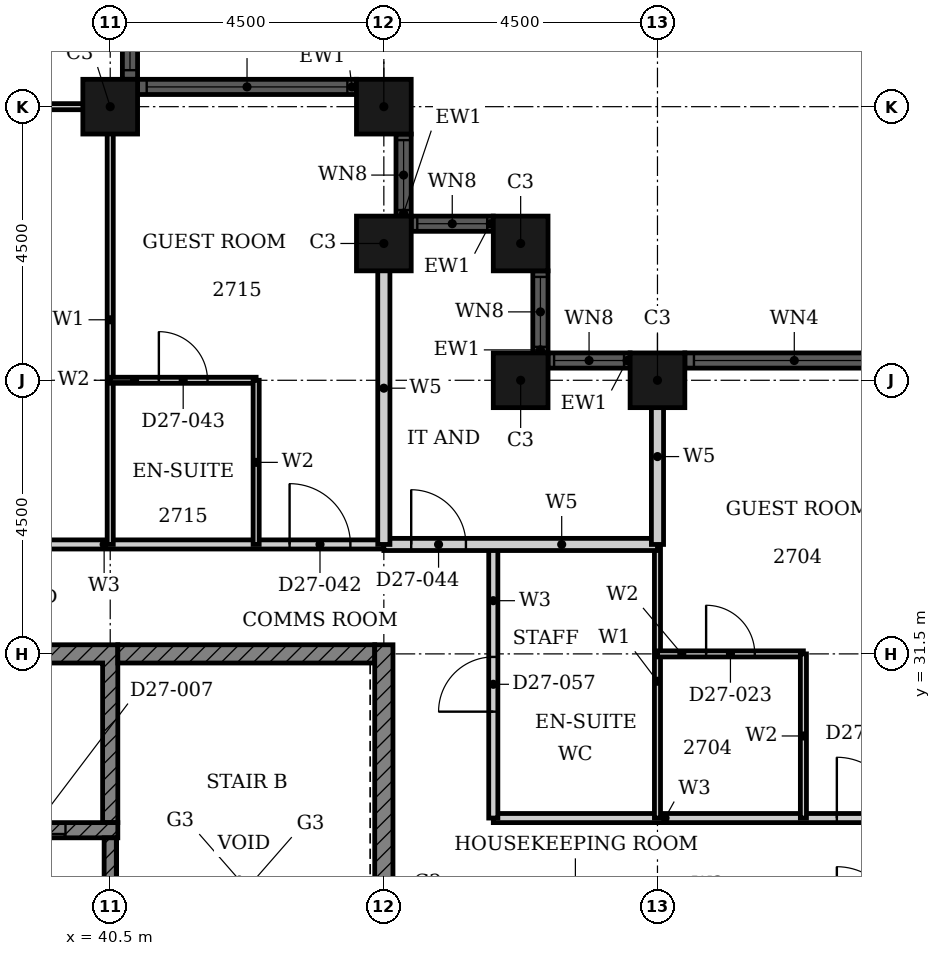
"""IFC4 building model, lengths in metres.
Left out: names, types, materials, properties, quantities, classifications, styles, units other than length and angle.
Written with IfcOpenShell. Run it as: python <this file> out.ifc"""

import sys

from ifc_helpers import new_model, si_unit, direction, frame, frame_2d, origin, origin_2d, place, context, subcontext, project, spatial, polyline, rectangle, hollow_rectangle, outline, extrude, element, fill, save


model = new_model("IFC4")
c1 = context("Model", 3, precision=1e-05, world=origin(), true_north=direction((0.0, 1.0)))
c2 = subcontext(c1, "Body", "Model", "MODEL_VIEW")
j1 = project(units=[si_unit("LENGTHUNIT", "METRE"), si_unit("PLANEANGLEUNIT", "RADIAN")], contexts=[c1])
p1 = place(None, origin())
s1 = spatial("IfcSite", under=j1, at=p1, CompositionType="ELEMENT")
p2 = place(p1, origin())
s2 = spatial("IfcBuilding", under=s1, at=p2, CompositionType="ELEMENT")
p3 = place(p2, frame((0.0, 0.0, 111.6)))
s3 = spatial("IfcBuildingStorey", under=s2, at=p3, CompositionType="ELEMENT", Elevation=111.6)
for number, where, z_axis, x_axis in (
    (1, (49.5, 36.0, 0.0), (0.0, 0.0, 1.0), (1.0, 0.0, 0.0)),
    (2, (47.25, 36.0, 0.0), (0.0, 0.0, 1.0), (1.0, 0.0, 0.0)),
    (3, (47.25, 38.25, 0.0), (0.0, 0.0, 1.0), (1.0, 0.0, 0.0)),
    (4, (45.0, 38.25, 0.0), (0.0, 0.0, 1.0), (1.0, 0.0, 0.0)),
    (5, (45.0, 40.5, 0.0), (0.0, 0.0, 1.0), (1.0, 0.0, 0.0)),
    (6, (40.5, 40.5, 0.0), (0.0, 0.0, 1.0), (1.0, 0.0, 0.0)),
):
    element("IfcColumn", number, at=place(p3, frame(where, z_axis=z_axis, x_axis=x_axis)), inside=s3, PredefinedType="COLUMN", context=c2, shape_type="SweptSolid", body=[
        extrude(hollow_rectangle(XDim=0.9, YDim=0.9, WallThickness=0.028, at=origin_2d()), origin(), (0.0, 0.0, 1.0), 3.6),
    ])
p4 = place(p3, frame((58.05, 36.325, 0.0), z_axis=(0.0, 0.0, 1.0), x_axis=(-1.0, 0.0, 0.0)))
e7 = element("IfcWall", 7, at=p4, inside=s3, PredefinedType="SOLIDWALL", context=c2, shape_type="SweptSolid", body=[
    extrude(rectangle(XDim=8.1, YDim=0.25, at=frame_2d((4.05, 0.0))), origin(), (0.0, 0.0, 1.0), 3.6),
])
p5 = place(p4, frame((0.15, 0.0, 0.9)))
e8 = element("IfcOpeningElement", 8, at=p5, cuts=e7, PredefinedType="OPENING", context=c2, shape_type="SweptSolid", body=[
    extrude(rectangle(XDim=3.3, YDim=2.08, at=frame_2d((1.65, 1.04))), frame((0.0, 0.135, 0.0), z_axis=(0.0, -1.0, 0.0), x_axis=(1.0, 0.0, 0.0)), (0.0, 0.0, 1.0), 0.27),
])
p6 = place(p4, frame((4.65, 0.0, 0.9)))
e9 = element("IfcOpeningElement", 9, at=p6, cuts=e7, PredefinedType="OPENING", context=c2, shape_type="SweptSolid", body=[
    extrude(rectangle(XDim=3.3, YDim=2.08, at=frame_2d((1.65, 1.04))), frame((0.0, 0.135, 0.0), z_axis=(0.0, -1.0, 0.0), x_axis=(1.0, 0.0, 0.0)), (0.0, 0.0, 1.0), 0.27),
])
p7 = place(p3, frame((49.05, 36.325, 0.0), z_axis=(0.0, 0.0, 1.0), x_axis=(-1.0, 0.0, 0.0)))
e10 = element("IfcWall", 10, at=p7, inside=s3, PredefinedType="SOLIDWALL", context=c2, shape_type="SweptSolid", body=[
    extrude(rectangle(XDim=1.35, YDim=0.25, at=frame_2d((0.675, 0.0))), origin(), (0.0, 0.0, 1.0), 3.6),
])
p8 = place(p7, frame((0.1, 0.0, 0.9)))
e11 = element("IfcOpeningElement", 11, at=p8, cuts=e10, PredefinedType="OPENING", context=c2, shape_type="SweptSolid", body=[
    extrude(rectangle(XDim=1.15, YDim=2.08, at=frame_2d((0.575, 1.04))), frame((0.0, 0.135, 0.0), z_axis=(0.0, -1.0, 0.0), x_axis=(1.0, 0.0, 0.0)), (0.0, 0.0, 1.0), 0.27),
])
p9 = place(p3, frame((47.575, 36.45, 0.0), z_axis=(0.0, 0.0, 1.0), x_axis=(0.0, 1.0, 0.0)))
e12 = element("IfcWall", 12, at=p9, inside=s3, PredefinedType="SOLIDWALL", context=c2, shape_type="SweptSolid", body=[
    extrude(rectangle(XDim=1.35, YDim=0.25, at=frame_2d((0.675, 0.0))), origin(), (0.0, 0.0, 1.0), 3.6),
])
p10 = place(p9, frame((0.1, 0.0, 0.9)))
e13 = element("IfcOpeningElement", 13, at=p10, cuts=e12, PredefinedType="OPENING", context=c2, shape_type="SweptSolid", body=[
    extrude(rectangle(XDim=1.15, YDim=2.08, at=frame_2d((0.575, 1.04))), frame((0.0, 0.135, 0.0), z_axis=(0.0, -1.0, 0.0), x_axis=(1.0, 0.0, 0.0)), (0.0, 0.0, 1.0), 0.27),
])
p11 = place(p3, frame((46.8, 38.575, 0.0), z_axis=(0.0, 0.0, 1.0), x_axis=(-1.0, 0.0, 0.0)))
e14 = element("IfcWall", 14, at=p11, inside=s3, PredefinedType="SOLIDWALL", context=c2, shape_type="SweptSolid", body=[
    extrude(rectangle(XDim=1.35, YDim=0.25, at=frame_2d((0.675, 0.0))), origin(), (0.0, 0.0, 1.0), 3.6),
])
p12 = place(p11, frame((0.1, 0.0, 0.9)))
e15 = element("IfcOpeningElement", 15, at=p12, cuts=e14, PredefinedType="OPENING", context=c2, shape_type="SweptSolid", body=[
    extrude(rectangle(XDim=1.15, YDim=2.08, at=frame_2d((0.575, 1.04))), frame((0.0, 0.135, 0.0), z_axis=(0.0, -1.0, 0.0), x_axis=(1.0, 0.0, 0.0)), (0.0, 0.0, 1.0), 0.27),
])
p13 = place(p3, frame((45.325, 38.7, 0.0), z_axis=(0.0, 0.0, 1.0), x_axis=(0.0, 1.0, 0.0)))
e16 = element("IfcWall", 16, at=p13, inside=s3, PredefinedType="SOLIDWALL", context=c2, shape_type="SweptSolid", body=[
    extrude(rectangle(XDim=1.35, YDim=0.25, at=frame_2d((0.675, 0.0))), origin(), (0.0, 0.0, 1.0), 3.6),
])
p14 = place(p13, frame((0.1, 0.0, 0.9)))
e17 = element("IfcOpeningElement", 17, at=p14, cuts=e16, PredefinedType="OPENING", context=c2, shape_type="SweptSolid", body=[
    extrude(rectangle(XDim=1.15, YDim=2.08, at=frame_2d((0.575, 1.04))), frame((0.0, 0.135, 0.0), z_axis=(0.0, -1.0, 0.0), x_axis=(1.0, 0.0, 0.0)), (0.0, 0.0, 1.0), 0.27),
])
p15 = place(p3, frame((44.55, 40.825, 0.0), z_axis=(0.0, 0.0, 1.0), x_axis=(-1.0, 0.0, 0.0)))
e18 = element("IfcWall", 18, at=p15, inside=s3, PredefinedType="SOLIDWALL", context=c2, shape_type="SweptSolid", body=[
    extrude(rectangle(XDim=3.6, YDim=0.25, at=frame_2d((1.8, 0.0))), origin(), (0.0, 0.0, 1.0), 3.6),
])
p16 = place(p15, frame((0.15, 0.0, 0.9)))
e19 = element("IfcOpeningElement", 19, at=p16, cuts=e18, PredefinedType="OPENING", context=c2, shape_type="SweptSolid", body=[
    extrude(rectangle(XDim=3.3, YDim=2.08, at=frame_2d((1.65, 1.04))), frame((0.0, 0.135, 0.0), z_axis=(0.0, -1.0, 0.0), x_axis=(1.0, 0.0, 0.0)), (0.0, 0.0, 1.0), 0.27),
])
p17 = place(p3, frame((40.825, 40.95, 0.0), z_axis=(0.0, 0.0, 1.0), x_axis=(0.0, 1.0, 0.0)))
e20 = element("IfcWall", 20, at=p17, inside=s3, PredefinedType="SOLIDWALL", context=c2, shape_type="SweptSolid", body=[
    extrude(rectangle(XDim=8.1, YDim=0.25, at=frame_2d((4.05, 0.0))), origin(), (0.0, 0.0, 1.0), 3.6),
])
p18 = place(p17, frame((0.15, 0.0, 0.9)))
e21 = element("IfcOpeningElement", 21, at=p18, cuts=e20, PredefinedType="OPENING", context=c2, shape_type="SweptSolid", body=[
    extrude(rectangle(XDim=3.3, YDim=2.08, at=frame_2d((1.65, 1.04))), frame((0.0, 0.135, 0.0), z_axis=(0.0, -1.0, 0.0), x_axis=(1.0, 0.0, 0.0)), (0.0, 0.0, 1.0), 0.27),
])
p19 = place(p17, frame((4.65, 0.0, 0.9)))
e22 = element("IfcOpeningElement", 22, at=p19, cuts=e20, PredefinedType="OPENING", context=c2, shape_type="SweptSolid", body=[
    extrude(rectangle(XDim=3.3, YDim=2.08, at=frame_2d((1.65, 1.04))), frame((0.0, 0.135, 0.0), z_axis=(0.0, -1.0, 0.0), x_axis=(1.0, 0.0, 0.0)), (0.0, 0.0, 1.0), 0.27),
])
p20 = place(p3, origin())
e23 = element("IfcWall", 23, at=p20, inside=s3, PredefinedType="SHEAR", context=c2, shape_type="SweptSolid", body=[
    extrude(outline(polyline([(24.947, 28.725), (25.197, 28.725), (25.197, 31.35), (27.518, 31.35), (27.518, 28.725), (27.768, 28.725), (27.768, 31.35), (30.089, 31.35), (30.089, 28.725), (30.339, 28.725), (30.339, 31.35), (32.661, 31.35), (32.661, 28.725), (32.911, 28.725), (32.911, 31.35), (35.232, 31.35), (35.232, 28.725), (35.482, 28.725), (35.482, 31.35), (37.803, 31.35), (37.803, 28.725), (38.053, 28.725), (38.053, 31.35), (40.375, 31.35), (40.375, 28.725), (40.625, 28.725), (40.625, 31.65), (24.947, 31.65), (24.947, 28.725)])), origin(), (0.0, 0.0, 1.0), 3.3),
])
p21 = place(p3, frame((40.625, 31.5, 0.0), z_axis=(0.0, 0.0, 1.0), x_axis=(1.0, 0.0, 0.0)))
e24 = element("IfcWall", 24, at=p21, inside=s3, PredefinedType="SHEAR", context=c2, shape_type="SweptSolid", body=[
    extrude(rectangle(XDim=4.225, YDim=0.3, at=frame_2d((2.113, 0.0))), origin(), (0.0, 0.0, 1.0), 3.3),
])
p22 = place(p3, frame((45.0, 22.35, 0.0), z_axis=(0.0, 0.0, 1.0), x_axis=(0.0, 1.0, 0.0)))
e25 = element("IfcWall", 25, at=p22, inside=s3, PredefinedType="SHEAR", context=c2, shape_type="SweptSolid", body=[
    extrude(rectangle(XDim=9.3, YDim=0.3, at=frame_2d((4.65, 0.0))), origin(), (0.0, 0.0, 1.0), 3.3),
])
p23 = place(p3, frame((24.947, 28.6, 0.0), z_axis=(0.0, 0.0, 1.0), x_axis=(1.0, 0.0, 0.0)))
e26 = element("IfcWall", 26, at=p23, inside=s3, PredefinedType="SHEAR", context=c2, shape_type="SweptSolid", body=[
    extrude(rectangle(XDim=15.678, YDim=0.25, at=frame_2d((7.839, 0.0))), origin(), (0.0, 0.0, 1.0), 3.3),
])
p24 = place(p23, frame((0.861, 0.0, 0.0)))
e27 = element("IfcOpeningElement", 27, at=p24, cuts=e26, PredefinedType="OPENING", context=c2, shape_type="SweptSolid", body=[
    extrude(rectangle(XDim=1.1, YDim=2.1, at=frame_2d((0.55, 1.05))), frame((0.0, 0.135, 0.0), z_axis=(0.0, -1.0, 0.0), x_axis=(1.0, 0.0, 0.0)), (0.0, 0.0, 1.0), 0.27),
])
p25 = place(p23, frame((8.575, 0.0, 0.0)))
e28 = element("IfcOpeningElement", 28, at=p25, cuts=e26, PredefinedType="OPENING", context=c2, shape_type="SweptSolid", body=[
    extrude(rectangle(XDim=1.1, YDim=2.1, at=frame_2d((0.55, 1.05))), frame((0.0, 0.135, 0.0), z_axis=(0.0, -1.0, 0.0), x_axis=(1.0, 0.0, 0.0)), (0.0, 0.0, 1.0), 0.27),
])
p26 = place(p23, frame((13.718, 0.0, 0.0)))
e29 = element("IfcOpeningElement", 29, at=p26, cuts=e26, PredefinedType="OPENING", context=c2, shape_type="SweptSolid", body=[
    extrude(rectangle(XDim=1.1, YDim=2.1, at=frame_2d((0.55, 1.05))), frame((0.0, 0.135, 0.0), z_axis=(0.0, -1.0, 0.0), x_axis=(1.0, 0.0, 0.0)), (0.0, 0.0, 1.0), 0.27),
])
p27 = place(p3, frame((40.5, 22.65, 0.0), z_axis=(0.0, 0.0, 1.0), x_axis=(0.0, 1.0, 0.0)))
e30 = element("IfcWall", 30, at=p27, inside=s3, PredefinedType="SHEAR", context=c2, shape_type="SweptSolid", body=[
    extrude(rectangle(XDim=5.825, YDim=0.2, at=frame_2d((2.913, 0.0))), origin(), (0.0, 0.0, 1.0), 3.3),
])
p28 = place(p27, frame((0.25, 0.0, 0.0)))
e31 = element("IfcOpeningElement", 31, at=p28, cuts=e30, PredefinedType="OPENING", context=c2, shape_type="SweptSolid", body=[
    extrude(rectangle(XDim=1.8, YDim=2.1, at=frame_2d((0.9, 1.05))), frame((0.0, 0.11, 0.0), z_axis=(0.0, -1.0, 0.0), x_axis=(1.0, 0.0, 0.0)), (0.0, 0.0, 1.0), 0.22),
])
p29 = place(p3, frame((46.8, 28.8, 0.0), z_axis=(0.0, 0.0, 1.0), x_axis=(1.0, 0.0, 0.0)))
e32 = element("IfcWall", 32, at=p29, inside=s3, PredefinedType="PARTITIONING", context=c2, shape_type="SweptSolid", body=[
    extrude(rectangle(XDim=7.2, YDim=0.15, at=frame_2d((3.6, 0.0))), origin(), (0.0, 0.0, 1.0), 3.3),
])
p30 = place(p29, frame((5.65, 0.0, 0.0)))
e33 = element("IfcOpeningElement", 33, at=p30, cuts=e32, PredefinedType="OPENING", context=c2, shape_type="SweptSolid", body=[
    extrude(rectangle(XDim=1.0, YDim=2.1, at=frame_2d((0.5, 1.05))), frame((0.0, 0.085, 0.0), z_axis=(0.0, -1.0, 0.0), x_axis=(1.0, 0.0, 0.0)), (0.0, 0.0, 1.0), 0.17),
])
p31 = place(p3, frame((33.3, 33.3, 0.0), z_axis=(0.0, 0.0, 1.0), x_axis=(1.0, 0.0, 0.0)))
e34 = element("IfcWall", 34, at=p31, inside=s3, PredefinedType="PARTITIONING", context=c2, shape_type="SweptSolid", body=[
    extrude(rectangle(XDim=11.7, YDim=0.15, at=frame_2d((5.85, 0.0))), origin(), (0.0, 0.0, 1.0), 3.3),
])
p32 = place(p31, frame((10.15, 0.0, 0.0)))
e35 = element("IfcOpeningElement", 35, at=p32, cuts=e34, PredefinedType="OPENING", context=c2, shape_type="SweptSolid", body=[
    extrude(rectangle(XDim=1.0, YDim=2.1, at=frame_2d((0.5, 1.05))), frame((0.0, 0.085, 0.0), z_axis=(0.0, -1.0, 0.0), x_axis=(1.0, 0.0, 0.0)), (0.0, 0.0, 1.0), 0.17),
])
p33 = place(p31, frame((3.15, 0.0, 0.0)))
e36 = element("IfcOpeningElement", 36, at=p33, cuts=e34, PredefinedType="OPENING", context=c2, shape_type="SweptSolid", body=[
    extrude(rectangle(XDim=0.9, YDim=2.1, at=frame_2d((0.45, 1.05))), frame((0.0, 0.085, 0.0), z_axis=(0.0, -1.0, 0.0), x_axis=(1.0, 0.0, 0.0)), (0.0, 0.0, 1.0), 0.17),
])
p34 = place(p3, frame((46.8, 28.8, 0.0), z_axis=(0.0, 0.0, 1.0), x_axis=(0.0, 1.0, 0.0)))
e37 = element("IfcWall", 37, at=p34, inside=s3, PredefinedType="PARTITIONING", context=c2, shape_type="SweptSolid", body=[
    extrude(rectangle(XDim=4.5, YDim=0.15, at=frame_2d((2.25, 0.0))), origin(), (0.0, 0.0, 1.0), 3.3),
])
p35 = place(p34, frame((1.75, 0.0, 0.0)))
e38 = element("IfcOpeningElement", 38, at=p35, cuts=e37, PredefinedType="OPENING", context=c2, shape_type="SweptSolid", body=[
    extrude(rectangle(XDim=0.9, YDim=2.1, at=frame_2d((0.45, 1.05))), frame((0.0, 0.085, 0.0), z_axis=(0.0, -1.0, 0.0), x_axis=(1.0, 0.0, 0.0)), (0.0, 0.0, 1.0), 0.17),
])
p36 = place(p3, frame((33.3, 40.5, 0.0), z_axis=(0.0, 0.0, 1.0), x_axis=(1.0, 0.0, 0.0)))
e39 = element("IfcWall", 39, at=p36, inside=s3, PredefinedType="PARTITIONING", context=c2, shape_type="SweptSolid", body=[
    extrude(rectangle(XDim=7.39, YDim=0.1, at=frame_2d((3.695, 0.0))), origin(), (0.0, 0.0, 1.0), 2.38),
])
p37 = place(p3, frame((40.5, 33.3, 0.0), z_axis=(0.0, 0.0, 1.0), x_axis=(0.0, 1.0, 0.0)))
e40 = element("IfcWall", 40, at=p37, inside=s3, PredefinedType="PARTITIONING", context=c2, shape_type="SweptSolid", body=[
    extrude(rectangle(XDim=7.39, YDim=0.1, at=frame_2d((3.695, 0.0))), origin(), (0.0, 0.0, 1.0), 3.3),
])
p38 = place(p3, frame((49.5, 28.8, 0.0), z_axis=(0.0, 0.0, 1.0), x_axis=(0.0, 1.0, 0.0)))
e41 = element("IfcWall", 41, at=p38, inside=s3, PredefinedType="PARTITIONING", context=c2, shape_type="SweptSolid", body=[
    extrude(rectangle(XDim=4.5, YDim=0.1, at=frame_2d((2.25, 0.0))), origin(), (0.0, 0.0, 1.0), 2.38),
])
p39 = place(p3, frame((49.5, 31.5, 0.0), z_axis=(0.0, 0.0, 1.0), x_axis=(1.0, 0.0, 0.0)))
e42 = element("IfcWall", 42, at=p39, inside=s3, PredefinedType="PARTITIONING", context=c2, shape_type="SweptSolid", body=[
    extrude(rectangle(XDim=2.4, YDim=0.1, at=frame_2d((1.2, 0.0))), origin(), (0.0, 0.0, 1.0), 2.58),
])
p40 = place(p39, frame((0.8, 0.0, 0.0)))
e43 = element("IfcOpeningElement", 43, at=p40, cuts=e42, PredefinedType="OPENING", context=c2, shape_type="SweptSolid", body=[
    extrude(rectangle(XDim=0.8, YDim=2.1, at=frame_2d((0.4, 1.05))), frame((0.0, 0.06, 0.0), z_axis=(0.0, -1.0, 0.0), x_axis=(1.0, 0.0, 0.0)), (0.0, 0.0, 1.0), 0.12),
])
p41 = place(p3, frame((40.5, 36.0, 0.0), z_axis=(0.0, 0.0, 1.0), x_axis=(1.0, 0.0, 0.0)))
e44 = element("IfcWall", 44, at=p41, inside=s3, PredefinedType="PARTITIONING", context=c2, shape_type="SweptSolid", body=[
    extrude(rectangle(XDim=2.4, YDim=0.1, at=frame_2d((1.2, 0.0))), origin(), (0.0, 0.0, 1.0), 3.3),
])
p42 = place(p41, frame((0.8, 0.0, 0.0)))
e45 = element("IfcOpeningElement", 45, at=p42, cuts=e44, PredefinedType="OPENING", context=c2, shape_type="SweptSolid", body=[
    extrude(rectangle(XDim=0.8, YDim=2.1, at=frame_2d((0.4, 1.05))), frame((0.0, 0.06, 0.0), z_axis=(0.0, -1.0, 0.0), x_axis=(1.0, 0.0, 0.0)), (0.0, 0.0, 1.0), 0.12),
])
for number, where, z_axis, x_axis in (
    (46, (42.9, 33.3, 0.0), (0.0, 0.0, 1.0), (0.0, 1.0, 0.0)),
    (47, (51.9, 28.8, 0.0), (0.0, 0.0, 1.0), (0.0, 1.0, 0.0)),
):
    element("IfcWall", number, at=place(p3, frame(where, z_axis=z_axis, x_axis=x_axis)), inside=s3, PredefinedType="PARTITIONING", context=c2, shape_type="SweptSolid", body=[
        extrude(rectangle(XDim=2.7, YDim=0.1, at=frame_2d((1.35, 0.0))), origin(), (0.0, 0.0, 1.0), 3.3),
    ])
p43 = place(p3, frame((45.0, 33.3, 0.0), z_axis=(0.0, 0.0, 1.0), x_axis=(1.0, 0.0, 0.0)))
e48 = element("IfcWall", 48, at=p43, inside=s3, PredefinedType="PARTITIONING", context=c2, shape_type="SweptSolid", body=[
    extrude(rectangle(XDim=4.5, YDim=0.2, at=frame_2d((2.25, 0.0))), origin(), (0.0, 0.0, 1.0), 3.3),
])
p44 = place(p43, frame((0.45, 0.0, 0.0)))
e49 = element("IfcOpeningElement", 49, at=p44, cuts=e48, PredefinedType="OPENING", context=c2, shape_type="SweptSolid", body=[
    extrude(rectangle(XDim=0.9, YDim=2.1, at=frame_2d((0.45, 1.05))), frame((0.0, 0.11, 0.0), z_axis=(0.0, -1.0, 0.0), x_axis=(1.0, 0.0, 0.0)), (0.0, 0.0, 1.0), 0.22),
])
p45 = place(p3, frame((45.0, 33.3, 0.0), z_axis=(0.0, 0.0, 1.0), x_axis=(0.0, 1.0, 0.0)))
e50 = element("IfcWall", 50, at=p45, inside=s3, PredefinedType="PARTITIONING", context=c2, shape_type="SweptSolid", body=[
    extrude(rectangle(XDim=5.14, YDim=0.2, at=frame_2d((2.57, 0.0))), origin(), (0.0, 0.0, 1.0), 3.3),
])
p46 = place(p3, frame((49.5, 33.3, 0.0), z_axis=(0.0, 0.0, 1.0), x_axis=(0.0, 1.0, 0.0)))
e51 = element("IfcWall", 51, at=p46, inside=s3, PredefinedType="PARTITIONING", context=c2, shape_type="SweptSolid", body=[
    extrude(rectangle(XDim=2.89, YDim=0.2, at=frame_2d((1.445, 0.0))), origin(), (0.0, 0.0, 1.0), 2.38),
])
p47 = place(p6, origin())
e52 = element("IfcWindow", 52, at=p47, inside=s3, PartitioningType="SINGLE_PANEL", PredefinedType="WINDOW", context=c2, shape_type="SweptSolid", body=[
    extrude(rectangle(XDim=3.3, YDim=2.08, at=frame_2d((1.65, 1.04))), frame((0.0, 0.03, 0.0), z_axis=(0.0, -1.0, 0.0), x_axis=(1.0, 0.0, 0.0)), (0.0, 0.0, 1.0), 0.06),
])
fill(e9, e52)
p48 = place(p8, origin())
e53 = element("IfcWindow", 53, at=p48, inside=s3, PartitioningType="SINGLE_PANEL", PredefinedType="WINDOW", context=c2, shape_type="SweptSolid", body=[
    extrude(rectangle(XDim=1.15, YDim=2.08, at=frame_2d((0.575, 1.04))), frame((0.0, 0.03, 0.0), z_axis=(0.0, -1.0, 0.0), x_axis=(1.0, 0.0, 0.0)), (0.0, 0.0, 1.0), 0.06),
])
fill(e11, e53)
p49 = place(p10, origin())
e54 = element("IfcWindow", 54, at=p49, inside=s3, PartitioningType="SINGLE_PANEL", PredefinedType="WINDOW", context=c2, shape_type="SweptSolid", body=[
    extrude(rectangle(XDim=1.15, YDim=2.08, at=frame_2d((0.575, 1.04))), frame((0.0, 0.03, 0.0), z_axis=(0.0, -1.0, 0.0), x_axis=(1.0, 0.0, 0.0)), (0.0, 0.0, 1.0), 0.06),
])
fill(e13, e54)
p50 = place(p12, origin())
e55 = element("IfcWindow", 55, at=p50, inside=s3, PartitioningType="SINGLE_PANEL", PredefinedType="WINDOW", context=c2, shape_type="SweptSolid", body=[
    extrude(rectangle(XDim=1.15, YDim=2.08, at=frame_2d((0.575, 1.04))), frame((0.0, 0.03, 0.0), z_axis=(0.0, -1.0, 0.0), x_axis=(1.0, 0.0, 0.0)), (0.0, 0.0, 1.0), 0.06),
])
fill(e15, e55)
p51 = place(p14, origin())
e56 = element("IfcWindow", 56, at=p51, inside=s3, PartitioningType="SINGLE_PANEL", PredefinedType="WINDOW", context=c2, shape_type="SweptSolid", body=[
    extrude(rectangle(XDim=1.15, YDim=2.08, at=frame_2d((0.575, 1.04))), frame((0.0, 0.03, 0.0), z_axis=(0.0, -1.0, 0.0), x_axis=(1.0, 0.0, 0.0)), (0.0, 0.0, 1.0), 0.06),
])
fill(e17, e56)
p52 = place(p16, origin())
e57 = element("IfcWindow", 57, at=p52, inside=s3, PartitioningType="SINGLE_PANEL", PredefinedType="WINDOW", context=c2, shape_type="SweptSolid", body=[
    extrude(rectangle(XDim=3.3, YDim=2.08, at=frame_2d((1.65, 1.04))), frame((0.0, 0.03, 0.0), z_axis=(0.0, -1.0, 0.0), x_axis=(1.0, 0.0, 0.0)), (0.0, 0.0, 1.0), 0.06),
])
fill(e19, e57)
p53 = place(p18, origin())
e58 = element("IfcWindow", 58, at=p53, inside=s3, PartitioningType="SINGLE_PANEL", PredefinedType="WINDOW", context=c2, shape_type="SweptSolid", body=[
    extrude(rectangle(XDim=3.3, YDim=2.08, at=frame_2d((1.65, 1.04))), frame((0.0, 0.03, 0.0), z_axis=(0.0, -1.0, 0.0), x_axis=(1.0, 0.0, 0.0)), (0.0, 0.0, 1.0), 0.06),
])
fill(e21, e58)
p54 = place(p26, origin())
e59 = element("IfcDoor", 59, at=p54, inside=s3, OperationType="DOUBLE_DOOR_SLIDING", PredefinedType="DOOR", context=c2, shape_type="SweptSolid", body=[
    extrude(rectangle(XDim=1.1, YDim=2.1, at=frame_2d((0.55, 1.05))), frame((0.0, 0.025, 0.0), z_axis=(0.0, -1.0, 0.0), x_axis=(1.0, 0.0, 0.0)), (0.0, 0.0, 1.0), 0.05),
])
fill(e29, e59)
p55 = place(p30, origin())
e60 = element("IfcDoor", 60, at=p55, inside=s3, OperationType="SINGLE_SWING_RIGHT", PredefinedType="DOOR", context=c2, shape_type="SweptSolid", body=[
    extrude(rectangle(XDim=1.0, YDim=2.1, at=frame_2d((0.5, 1.05))), frame((0.0, 0.025, 0.0), z_axis=(0.0, -1.0, 0.0), x_axis=(1.0, 0.0, 0.0)), (0.0, 0.0, 1.0), 0.05),
])
fill(e33, e60)
p56 = place(p40, origin())
e61 = element("IfcDoor", 61, at=p56, inside=s3, OperationType="SINGLE_SWING_RIGHT", PredefinedType="DOOR", context=c2, shape_type="SweptSolid", body=[
    extrude(rectangle(XDim=0.8, YDim=2.1, at=frame_2d((0.4, 1.05))), frame((0.0, 0.025, 0.0), z_axis=(0.0, -1.0, 0.0), x_axis=(1.0, 0.0, 0.0)), (0.0, 0.0, 1.0), 0.05),
])
fill(e43, e61)
p57 = place(p32, origin())
e62 = element("IfcDoor", 62, at=p57, inside=s3, OperationType="SINGLE_SWING_RIGHT", PredefinedType="DOOR", context=c2, shape_type="SweptSolid", body=[
    extrude(rectangle(XDim=1.0, YDim=2.1, at=frame_2d((0.5, 1.05))), frame((0.0, 0.025, 0.0), z_axis=(0.0, -1.0, 0.0), x_axis=(1.0, 0.0, 0.0)), (0.0, 0.0, 1.0), 0.05),
])
fill(e35, e62)
p58 = place(p42, origin())
e63 = element("IfcDoor", 63, at=p58, inside=s3, OperationType="SINGLE_SWING_LEFT", PredefinedType="DOOR", context=c2, shape_type="SweptSolid", body=[
    extrude(rectangle(XDim=0.8, YDim=2.1, at=frame_2d((0.4, 1.05))), frame((0.0, 0.025, 0.0), z_axis=(0.0, -1.0, 0.0), x_axis=(1.0, 0.0, 0.0)), (0.0, 0.0, 1.0), 0.05),
])
fill(e45, e63)
p59 = place(p44, origin())
e64 = element("IfcDoor", 64, at=p59, inside=s3, OperationType="SINGLE_SWING_RIGHT", PredefinedType="DOOR", context=c2, shape_type="SweptSolid", body=[
    extrude(rectangle(XDim=0.9, YDim=2.1, at=frame_2d((0.45, 1.05))), frame((0.0, 0.025, 0.0), z_axis=(0.0, -1.0, 0.0), x_axis=(1.0, 0.0, 0.0)), (0.0, 0.0, 1.0), 0.05),
])
fill(e49, e64)
p60 = place(p35, origin())
e65 = element("IfcDoor", 65, at=p60, inside=s3, OperationType="SINGLE_SWING_LEFT", PredefinedType="DOOR", context=c2, shape_type="SweptSolid", body=[
    extrude(rectangle(XDim=0.9, YDim=2.1, at=frame_2d((0.45, 1.05))), frame((0.0, 0.025, 0.0), z_axis=(0.0, -1.0, 0.0), x_axis=(1.0, 0.0, 0.0)), (0.0, 0.0, 1.0), 0.05),
])
fill(e38, e65)
save(model, sys.argv[1])
